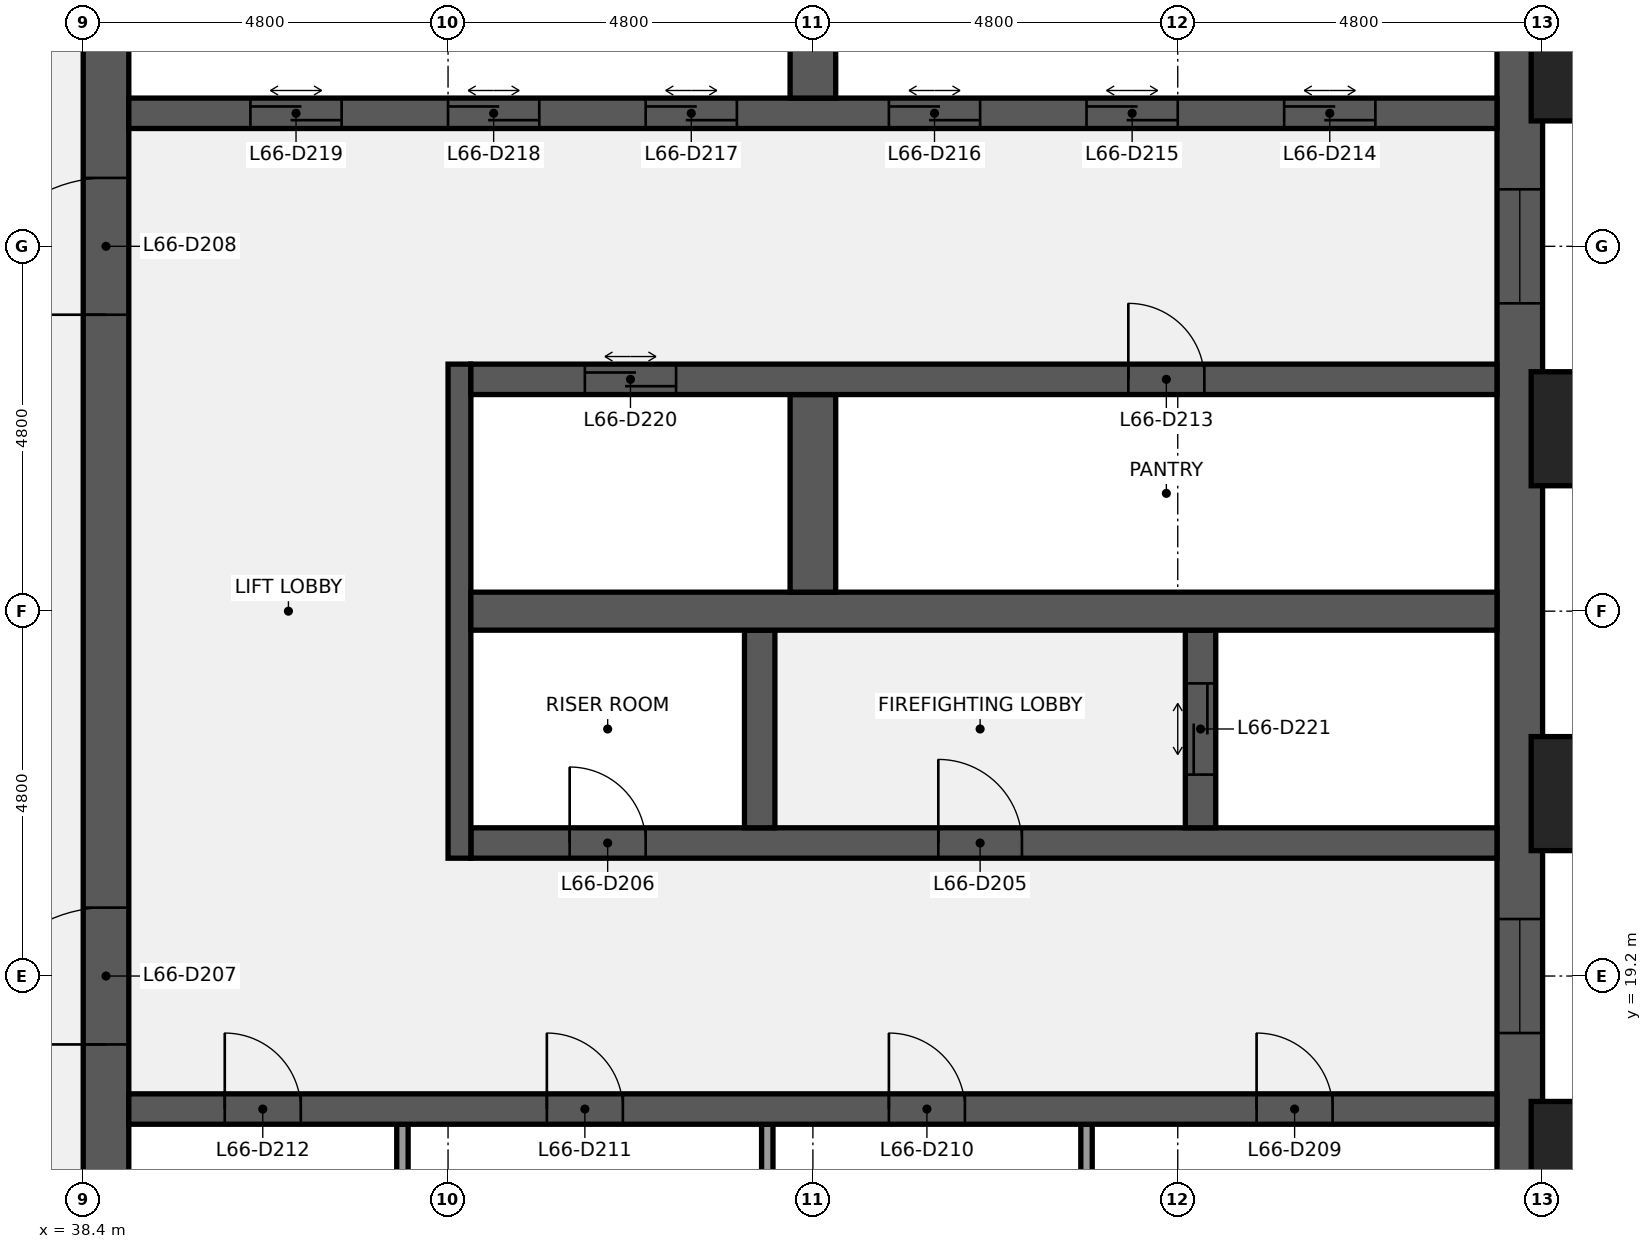
"""IFC4 building model, lengths in metres.
Left out: names, types, materials, properties, quantities, classifications, styles, units other than length and angle.
Written with IfcOpenShell. Run it as: python <this file> out.ifc"""

import sys

from ifc_helpers import new_model, si_unit, direction, frame, frame_2d, origin, origin_2d, place, context, subcontext, project, spatial, rectangle, extrude, element, fill, save


model = new_model("IFC4")
c1 = context("Model", 3, precision=1e-05, world=origin(), true_north=direction((0.0, 1.0)))
c2 = subcontext(c1, "Body", "Model", "MODEL_VIEW")
j1 = project(units=[si_unit("LENGTHUNIT", "METRE"), si_unit("PLANEANGLEUNIT", "RADIAN")], contexts=[c1])
p1 = place(None, origin())
s1 = spatial("IfcSite", under=j1, at=p1, CompositionType="ELEMENT")
p2 = place(p1, origin())
s2 = spatial("IfcBuilding", under=s1, at=p2, CompositionType="ELEMENT")
p3 = place(p2, frame((0.0, 0.0, 302.3)))
s3 = spatial("IfcBuildingStorey", under=s2, at=p3, CompositionType="ELEMENT", Elevation=302.3)
p4 = place(p3, frame((57.3, 38.4, 0.0), z_axis=(0.0, 0.0, 1.0), x_axis=(0.0, -1.0, 0.0)))
e1 = element("IfcWall", 1, at=p4, inside=s3, PredefinedType="SHEAR", context=c2, shape_type="SweptSolid", body=[
    extrude(rectangle(XDim=28.8, YDim=0.6, at=frame_2d((14.4, 0.0))), origin(), (0.0, 0.0, 1.0), 3.84),
])
p5 = place(p4, frame((18.45, 0.0, 0.9)))
e2 = element("IfcOpeningElement", 2, at=p5, cuts=e1, PredefinedType="OPENING", context=c2, shape_type="SweptSolid", body=[
    extrude(rectangle(XDim=1.5, YDim=1.5, at=frame_2d((0.75, 0.75))), frame((0.0, 0.31, 0.0), z_axis=(0.0, -1.0, 0.0), x_axis=(1.0, 0.0, 0.0)), (0.0, 0.0, 1.0), 0.62),
])
p6 = place(p4, frame((8.85, 0.0, 0.9)))
e3 = element("IfcOpeningElement", 3, at=p6, cuts=e1, PredefinedType="OPENING", context=c2, shape_type="SweptSolid", body=[
    extrude(rectangle(XDim=1.5, YDim=1.5, at=frame_2d((0.75, 0.75))), frame((0.0, 0.31, 0.0), z_axis=(0.0, -1.0, 0.0), x_axis=(1.0, 0.0, 0.0)), (0.0, 0.0, 1.0), 0.62),
])
p7 = place(p3, frame((38.7, 9.6, 0.0), z_axis=(0.0, 0.0, 1.0), x_axis=(0.0, 1.0, 0.0)))
e4 = element("IfcWall", 4, at=p7, inside=s3, PredefinedType="SHEAR", context=c2, shape_type="SweptSolid", body=[
    extrude(rectangle(XDim=28.8, YDim=0.6, at=frame_2d((14.4, 0.0))), origin(), (0.0, 0.0, 1.0), 3.84),
])
p8 = place(p7, frame((8.7, 0.0, 0.0)))
e5 = element("IfcOpeningElement", 5, at=p8, cuts=e4, PredefinedType="OPENING", context=c2, shape_type="SweptSolid", body=[
    extrude(rectangle(XDim=1.8, YDim=2.1, at=frame_2d((0.9, 1.05))), frame((0.0, 0.31, 0.0), z_axis=(0.0, -1.0, 0.0), x_axis=(1.0, 0.0, 0.0)), (0.0, 0.0, 1.0), 0.62),
])
p9 = place(p7, frame((18.3, 0.0, 0.0)))
e6 = element("IfcOpeningElement", 6, at=p9, cuts=e4, PredefinedType="OPENING", context=c2, shape_type="SweptSolid", body=[
    extrude(rectangle(XDim=1.8, YDim=2.1, at=frame_2d((0.9, 1.05))), frame((0.0, 0.31, 0.0), z_axis=(0.0, -1.0, 0.0), x_axis=(1.0, 0.0, 0.0)), (0.0, 0.0, 1.0), 0.62),
])
for number, where, z_axis, x_axis in (
    (7, (51.6, 14.65, 0.0), (0.0, 0.0, 1.0), (0.0, 1.0, 0.0)),
    (8, (47.4, 14.65, 0.0), (0.0, 0.0, 1.0), (0.0, 1.0, 0.0)),
    (9, (42.6, 14.65, 0.0), (0.0, 0.0, 1.0), (0.0, 1.0, 0.0)),
):
    element("IfcWall", number, at=place(p3, frame(where, z_axis=z_axis, x_axis=x_axis)), inside=s3, PredefinedType="PARTITIONING", context=c2, shape_type="SweptSolid", body=[
        extrude(rectangle(XDim=2.6, YDim=0.15, at=frame_2d((1.3, 0.0))), origin(), (0.0, 0.0, 1.0), 3.84),
    ])
p10 = place(p3, frame((39.0, 17.45, 0.0), z_axis=(0.0, 0.0, 1.0), x_axis=(1.0, 0.0, 0.0)))
e10 = element("IfcWall", 10, at=p10, inside=s3, PredefinedType="SHEAR", context=c2, shape_type="SweptSolid", body=[
    extrude(rectangle(XDim=18.0, YDim=0.4, at=frame_2d((9.0, 0.0))), origin(), (0.0, 0.0, 1.0), 3.84),
])
p11 = place(p10, frame((14.837, 0.0, 0.0)))
e11 = element("IfcOpeningElement", 11, at=p11, cuts=e10, PredefinedType="OPENING", context=c2, shape_type="SweptSolid", body=[
    extrude(rectangle(XDim=1.0, YDim=2.1, at=frame_2d((0.5, 1.05))), frame((0.0, 0.21, 0.0), z_axis=(0.0, -1.0, 0.0), x_axis=(1.0, 0.0, 0.0)), (0.0, 0.0, 1.0), 0.42),
])
p12 = place(p10, frame((10.0, 0.0, 0.0)))
e12 = element("IfcOpeningElement", 12, at=p12, cuts=e10, PredefinedType="OPENING", context=c2, shape_type="SweptSolid", body=[
    extrude(rectangle(XDim=1.0, YDim=2.1, at=frame_2d((0.5, 1.05))), frame((0.0, 0.21, 0.0), z_axis=(0.0, -1.0, 0.0), x_axis=(1.0, 0.0, 0.0)), (0.0, 0.0, 1.0), 0.42),
])
p13 = place(p10, frame((5.5, 0.0, 0.0)))
e13 = element("IfcOpeningElement", 13, at=p13, cuts=e10, PredefinedType="OPENING", context=c2, shape_type="SweptSolid", body=[
    extrude(rectangle(XDim=1.0, YDim=2.1, at=frame_2d((0.5, 1.05))), frame((0.0, 0.21, 0.0), z_axis=(0.0, -1.0, 0.0), x_axis=(1.0, 0.0, 0.0)), (0.0, 0.0, 1.0), 0.42),
])
p14 = place(p10, frame((1.262, 0.0, 0.0)))
e14 = element("IfcOpeningElement", 14, at=p14, cuts=e10, PredefinedType="OPENING", context=c2, shape_type="SweptSolid", body=[
    extrude(rectangle(XDim=1.0, YDim=2.1, at=frame_2d((0.5, 1.05))), frame((0.0, 0.21, 0.0), z_axis=(0.0, -1.0, 0.0), x_axis=(1.0, 0.0, 0.0)), (0.0, 0.0, 1.0), 0.42),
])
p15 = place(p3, frame((43.5, 20.95, 0.0), z_axis=(0.0, 0.0, 1.0), x_axis=(1.0, 0.0, 0.0)))
e15 = element("IfcWall", 15, at=p15, inside=s3, PredefinedType="SHEAR", context=c2, shape_type="SweptSolid", body=[
    extrude(rectangle(XDim=13.5, YDim=0.4, at=frame_2d((6.75, 0.0))), origin(), (0.0, 0.0, 1.0), 3.84),
])
p16 = place(p15, frame((6.15, 0.0, 0.0)))
e16 = element("IfcOpeningElement", 16, at=p16, cuts=e15, PredefinedType="OPENING", context=c2, shape_type="SweptSolid", body=[
    extrude(rectangle(XDim=1.1, YDim=2.1, at=frame_2d((0.55, 1.05))), frame((0.0, 0.21, 0.0), z_axis=(0.0, -1.0, 0.0), x_axis=(1.0, 0.0, 0.0)), (0.0, 0.0, 1.0), 0.42),
])
p17 = place(p15, frame((1.3, 0.0, 0.0)))
e17 = element("IfcOpeningElement", 17, at=p17, cuts=e15, PredefinedType="OPENING", context=c2, shape_type="SweptSolid", body=[
    extrude(rectangle(XDim=1.0, YDim=2.1, at=frame_2d((0.5, 1.05))), frame((0.0, 0.21, 0.0), z_axis=(0.0, -1.0, 0.0), x_axis=(1.0, 0.0, 0.0)), (0.0, 0.0, 1.0), 0.42),
])
p18 = place(p3, frame((43.35, 20.75, 0.0), z_axis=(0.0, 0.0, 1.0), x_axis=(0.0, 1.0, 0.0)))
e18 = element("IfcWall", 18, at=p18, inside=s3, PredefinedType="SHEAR", context=c2, shape_type="SweptSolid", body=[
    extrude(rectangle(XDim=6.5, YDim=0.3, at=frame_2d((3.25, 0.0))), origin(), (0.0, 0.0, 1.0), 3.84),
])
p19 = place(p3, frame((53.1, 21.15, 0.0), z_axis=(0.0, 0.0, 1.0), x_axis=(0.0, 1.0, 0.0)))
e19 = element("IfcWall", 19, at=p19, inside=s3, PredefinedType="SHEAR", context=c2, shape_type="SweptSolid", body=[
    extrude(rectangle(XDim=2.6, YDim=0.4, at=frame_2d((1.3, 0.0))), origin(), (0.0, 0.0, 1.0), 3.84),
])
p20 = place(p19, frame((0.7, 0.0, 0.0)))
e20 = element("IfcOpeningElement", 20, at=p20, cuts=e19, PredefinedType="OPENING", context=c2, shape_type="SweptSolid", body=[
    extrude(rectangle(XDim=1.2, YDim=2.1, at=frame_2d((0.6, 1.05))), frame((0.0, 0.21, 0.0), z_axis=(0.0, -1.0, 0.0), x_axis=(1.0, 0.0, 0.0)), (0.0, 0.0, 1.0), 0.42),
])
p21 = place(p3, frame((47.3, 21.15, 0.0), z_axis=(0.0, 0.0, 1.0), x_axis=(0.0, 1.0, 0.0)))
e21 = element("IfcWall", 21, at=p21, inside=s3, PredefinedType="SHEAR", context=c2, shape_type="SweptSolid", body=[
    extrude(rectangle(XDim=2.6, YDim=0.4, at=frame_2d((1.3, 0.0))), origin(), (0.0, 0.0, 1.0), 3.84),
])
p22 = place(p3, frame((43.5, 24.0, 0.0), z_axis=(0.0, 0.0, 1.0), x_axis=(1.0, 0.0, 0.0)))
e22 = element("IfcWall", 22, at=p22, inside=s3, PredefinedType="SHEAR", context=c2, shape_type="SweptSolid", body=[
    extrude(rectangle(XDim=13.5, YDim=0.5, at=frame_2d((6.75, 0.0))), origin(), (0.0, 0.0, 1.0), 3.84),
])
p23 = place(p3, frame((48.0, 24.25, 0.0), z_axis=(0.0, 0.0, 1.0), x_axis=(0.0, 1.0, 0.0)))
e23 = element("IfcWall", 23, at=p23, inside=s3, PredefinedType="SHEAR", context=c2, shape_type="SweptSolid", body=[
    extrude(rectangle(XDim=2.6, YDim=0.6, at=frame_2d((1.3, 0.0))), origin(), (0.0, 0.0, 1.0), 3.84),
])
p24 = place(p3, frame((43.5, 27.05, 0.0), z_axis=(0.0, 0.0, 1.0), x_axis=(1.0, 0.0, 0.0)))
e24 = element("IfcWall", 24, at=p24, inside=s3, PredefinedType="SHEAR", context=c2, shape_type="SweptSolid", body=[
    extrude(rectangle(XDim=13.5, YDim=0.4, at=frame_2d((6.75, 0.0))), origin(), (0.0, 0.0, 1.0), 3.84),
])
p25 = place(p24, frame((8.65, 0.0, 0.0)))
e25 = element("IfcOpeningElement", 25, at=p25, cuts=e24, PredefinedType="OPENING", context=c2, shape_type="SweptSolid", body=[
    extrude(rectangle(XDim=1.0, YDim=2.1, at=frame_2d((0.5, 1.05))), frame((0.0, 0.21, 0.0), z_axis=(0.0, -1.0, 0.0), x_axis=(1.0, 0.0, 0.0)), (0.0, 0.0, 1.0), 0.42),
])
p26 = place(p24, frame((1.5, 0.0, 0.0)))
e26 = element("IfcOpeningElement", 26, at=p26, cuts=e24, PredefinedType="OPENING", context=c2, shape_type="SweptSolid", body=[
    extrude(rectangle(XDim=1.2, YDim=2.1, at=frame_2d((0.6, 1.05))), frame((0.0, 0.21, 0.0), z_axis=(0.0, -1.0, 0.0), x_axis=(1.0, 0.0, 0.0)), (0.0, 0.0, 1.0), 0.42),
])
p27 = place(p3, frame((39.0, 30.55, 0.0), z_axis=(0.0, 0.0, 1.0), x_axis=(1.0, 0.0, 0.0)))
e27 = element("IfcWall", 27, at=p27, inside=s3, PredefinedType="SHEAR", context=c2, shape_type="SweptSolid", body=[
    extrude(rectangle(XDim=18.0, YDim=0.4, at=frame_2d((9.0, 0.0))), origin(), (0.0, 0.0, 1.0), 3.84),
])
p28 = place(p27, frame((15.2, 0.0, 0.0)))
e28 = element("IfcOpeningElement", 28, at=p28, cuts=e27, PredefinedType="OPENING", context=c2, shape_type="SweptSolid", body=[
    extrude(rectangle(XDim=1.2, YDim=2.1, at=frame_2d((0.6, 1.05))), frame((0.0, 0.21, 0.0), z_axis=(0.0, -1.0, 0.0), x_axis=(1.0, 0.0, 0.0)), (0.0, 0.0, 1.0), 0.42),
])
p29 = place(p27, frame((12.6, 0.0, 0.0)))
e29 = element("IfcOpeningElement", 29, at=p29, cuts=e27, PredefinedType="OPENING", context=c2, shape_type="SweptSolid", body=[
    extrude(rectangle(XDim=1.2, YDim=2.1, at=frame_2d((0.6, 1.05))), frame((0.0, 0.21, 0.0), z_axis=(0.0, -1.0, 0.0), x_axis=(1.0, 0.0, 0.0)), (0.0, 0.0, 1.0), 0.42),
])
p30 = place(p27, frame((10.0, 0.0, 0.0)))
e30 = element("IfcOpeningElement", 30, at=p30, cuts=e27, PredefinedType="OPENING", context=c2, shape_type="SweptSolid", body=[
    extrude(rectangle(XDim=1.2, YDim=2.1, at=frame_2d((0.6, 1.05))), frame((0.0, 0.21, 0.0), z_axis=(0.0, -1.0, 0.0), x_axis=(1.0, 0.0, 0.0)), (0.0, 0.0, 1.0), 0.42),
])
p31 = place(p27, frame((6.8, 0.0, 0.0)))
e31 = element("IfcOpeningElement", 31, at=p31, cuts=e27, PredefinedType="OPENING", context=c2, shape_type="SweptSolid", body=[
    extrude(rectangle(XDim=1.2, YDim=2.1, at=frame_2d((0.6, 1.05))), frame((0.0, 0.21, 0.0), z_axis=(0.0, -1.0, 0.0), x_axis=(1.0, 0.0, 0.0)), (0.0, 0.0, 1.0), 0.42),
])
p32 = place(p27, frame((4.2, 0.0, 0.0)))
e32 = element("IfcOpeningElement", 32, at=p32, cuts=e27, PredefinedType="OPENING", context=c2, shape_type="SweptSolid", body=[
    extrude(rectangle(XDim=1.2, YDim=2.1, at=frame_2d((0.6, 1.05))), frame((0.0, 0.21, 0.0), z_axis=(0.0, -1.0, 0.0), x_axis=(1.0, 0.0, 0.0)), (0.0, 0.0, 1.0), 0.42),
])
p33 = place(p27, frame((1.6, 0.0, 0.0)))
e33 = element("IfcOpeningElement", 33, at=p33, cuts=e27, PredefinedType="OPENING", context=c2, shape_type="SweptSolid", body=[
    extrude(rectangle(XDim=1.2, YDim=2.1, at=frame_2d((0.6, 1.05))), frame((0.0, 0.21, 0.0), z_axis=(0.0, -1.0, 0.0), x_axis=(1.0, 0.0, 0.0)), (0.0, 0.0, 1.0), 0.42),
])
p34 = place(p3, frame((48.0, 30.75, 0.0), z_axis=(0.0, 0.0, 1.0), x_axis=(0.0, 1.0, 0.0)))
e34 = element("IfcWall", 34, at=p34, inside=s3, PredefinedType="SHEAR", context=c2, shape_type="SweptSolid", body=[
    extrude(rectangle(XDim=2.6, YDim=0.6, at=frame_2d((1.3, 0.0))), origin(), (0.0, 0.0, 1.0), 3.84),
])
for number, where, z_axis, x_axis in (
    (35, (58.35, 16.8, 0.0), (0.0, 0.0, 1.0), (0.0, 1.0, 0.0)),
    (36, (58.35, 21.6, 0.0), (0.0, 0.0, 1.0), (0.0, 1.0, 0.0)),
    (37, (58.35, 26.4, 0.0), (0.0, 0.0, 1.0), (0.0, 1.0, 0.0)),
    (38, (58.35, 31.2, 0.0), (0.0, 0.0, 1.0), (0.0, 1.0, 0.0)),
):
    element("IfcColumn", number, at=place(p3, frame(where, z_axis=z_axis, x_axis=x_axis)), inside=s3, PredefinedType="PILASTER", context=c2, shape_type="SweptSolid", body=[
        extrude(rectangle(XDim=1.8, YDim=1.5, at=origin_2d()), origin(), (0.0, 0.0, 1.0), 4.0),
    ])
p35 = place(p16, origin())
e39 = element("IfcDoor", 39, at=p35, inside=s3, OperationType="SINGLE_SWING_LEFT", PredefinedType="DOOR", context=c2, shape_type="SweptSolid", body=[
    extrude(rectangle(XDim=1.1, YDim=2.1, at=frame_2d((0.55, 1.05))), frame((0.0, 0.025, 0.0), z_axis=(0.0, -1.0, 0.0), x_axis=(1.0, 0.0, 0.0)), (0.0, 0.0, 1.0), 0.05),
])
fill(e16, e39)
p36 = place(p17, origin())
e40 = element("IfcDoor", 40, at=p36, inside=s3, OperationType="SINGLE_SWING_LEFT", PredefinedType="DOOR", context=c2, shape_type="SweptSolid", body=[
    extrude(rectangle(XDim=1.0, YDim=2.1, at=frame_2d((0.5, 1.05))), frame((0.0, 0.025, 0.0), z_axis=(0.0, -1.0, 0.0), x_axis=(1.0, 0.0, 0.0)), (0.0, 0.0, 1.0), 0.05),
])
fill(e17, e40)
p37 = place(p8, origin())
e41 = element("IfcDoor", 41, at=p37, inside=s3, OperationType="DOUBLE_DOOR_SINGLE_SWING", PredefinedType="DOOR", context=c2, shape_type="SweptSolid", body=[
    extrude(rectangle(XDim=1.8, YDim=2.1, at=frame_2d((0.9, 1.05))), frame((0.0, 0.025, 0.0), z_axis=(0.0, -1.0, 0.0), x_axis=(1.0, 0.0, 0.0)), (0.0, 0.0, 1.0), 0.05),
])
fill(e5, e41)
p38 = place(p9, origin())
e42 = element("IfcDoor", 42, at=p38, inside=s3, OperationType="DOUBLE_DOOR_SINGLE_SWING", PredefinedType="DOOR", context=c2, shape_type="SweptSolid", body=[
    extrude(rectangle(XDim=1.8, YDim=2.1, at=frame_2d((0.9, 1.05))), frame((0.0, 0.025, 0.0), z_axis=(0.0, -1.0, 0.0), x_axis=(1.0, 0.0, 0.0)), (0.0, 0.0, 1.0), 0.05),
])
fill(e6, e42)
p39 = place(p11, origin())
e43 = element("IfcDoor", 43, at=p39, inside=s3, OperationType="SINGLE_SWING_LEFT", PredefinedType="DOOR", context=c2, shape_type="SweptSolid", body=[
    extrude(rectangle(XDim=1.0, YDim=2.1, at=frame_2d((0.5, 1.05))), frame((0.0, 0.025, 0.0), z_axis=(0.0, -1.0, 0.0), x_axis=(1.0, 0.0, 0.0)), (0.0, 0.0, 1.0), 0.05),
])
fill(e11, e43)
p40 = place(p12, origin())
e44 = element("IfcDoor", 44, at=p40, inside=s3, OperationType="SINGLE_SWING_LEFT", PredefinedType="DOOR", context=c2, shape_type="SweptSolid", body=[
    extrude(rectangle(XDim=1.0, YDim=2.1, at=frame_2d((0.5, 1.05))), frame((0.0, 0.025, 0.0), z_axis=(0.0, -1.0, 0.0), x_axis=(1.0, 0.0, 0.0)), (0.0, 0.0, 1.0), 0.05),
])
fill(e12, e44)
p41 = place(p13, origin())
e45 = element("IfcDoor", 45, at=p41, inside=s3, OperationType="SINGLE_SWING_LEFT", PredefinedType="DOOR", context=c2, shape_type="SweptSolid", body=[
    extrude(rectangle(XDim=1.0, YDim=2.1, at=frame_2d((0.5, 1.05))), frame((0.0, 0.025, 0.0), z_axis=(0.0, -1.0, 0.0), x_axis=(1.0, 0.0, 0.0)), (0.0, 0.0, 1.0), 0.05),
])
fill(e13, e45)
p42 = place(p14, origin())
e46 = element("IfcDoor", 46, at=p42, inside=s3, OperationType="SINGLE_SWING_LEFT", PredefinedType="DOOR", context=c2, shape_type="SweptSolid", body=[
    extrude(rectangle(XDim=1.0, YDim=2.1, at=frame_2d((0.5, 1.05))), frame((0.0, 0.025, 0.0), z_axis=(0.0, -1.0, 0.0), x_axis=(1.0, 0.0, 0.0)), (0.0, 0.0, 1.0), 0.05),
])
fill(e14, e46)
p43 = place(p25, origin())
e47 = element("IfcDoor", 47, at=p43, inside=s3, OperationType="SINGLE_SWING_LEFT", PredefinedType="DOOR", context=c2, shape_type="SweptSolid", body=[
    extrude(rectangle(XDim=1.0, YDim=2.1, at=frame_2d((0.5, 1.05))), frame((0.0, 0.025, 0.0), z_axis=(0.0, -1.0, 0.0), x_axis=(1.0, 0.0, 0.0)), (0.0, 0.0, 1.0), 0.05),
])
fill(e25, e47)
p44 = place(p28, origin())
e48 = element("IfcDoor", 48, at=p44, inside=s3, OperationType="DOUBLE_DOOR_SLIDING", PredefinedType="DOOR", context=c2, shape_type="SweptSolid", body=[
    extrude(rectangle(XDim=1.2, YDim=2.1, at=frame_2d((0.6, 1.05))), frame((0.0, 0.025, 0.0), z_axis=(0.0, -1.0, 0.0), x_axis=(1.0, 0.0, 0.0)), (0.0, 0.0, 1.0), 0.05),
])
fill(e28, e48)
p45 = place(p29, origin())
e49 = element("IfcDoor", 49, at=p45, inside=s3, OperationType="DOUBLE_DOOR_SLIDING", PredefinedType="DOOR", context=c2, shape_type="SweptSolid", body=[
    extrude(rectangle(XDim=1.2, YDim=2.1, at=frame_2d((0.6, 1.05))), frame((0.0, 0.025, 0.0), z_axis=(0.0, -1.0, 0.0), x_axis=(1.0, 0.0, 0.0)), (0.0, 0.0, 1.0), 0.05),
])
fill(e29, e49)
p46 = place(p30, origin())
e50 = element("IfcDoor", 50, at=p46, inside=s3, OperationType="DOUBLE_DOOR_SLIDING", PredefinedType="DOOR", context=c2, shape_type="SweptSolid", body=[
    extrude(rectangle(XDim=1.2, YDim=2.1, at=frame_2d((0.6, 1.05))), frame((0.0, 0.025, 0.0), z_axis=(0.0, -1.0, 0.0), x_axis=(1.0, 0.0, 0.0)), (0.0, 0.0, 1.0), 0.05),
])
fill(e30, e50)
p47 = place(p31, origin())
e51 = element("IfcDoor", 51, at=p47, inside=s3, OperationType="DOUBLE_DOOR_SLIDING", PredefinedType="DOOR", context=c2, shape_type="SweptSolid", body=[
    extrude(rectangle(XDim=1.2, YDim=2.1, at=frame_2d((0.6, 1.05))), frame((0.0, 0.025, 0.0), z_axis=(0.0, -1.0, 0.0), x_axis=(1.0, 0.0, 0.0)), (0.0, 0.0, 1.0), 0.05),
])
fill(e31, e51)
p48 = place(p32, origin())
e52 = element("IfcDoor", 52, at=p48, inside=s3, OperationType="DOUBLE_DOOR_SLIDING", PredefinedType="DOOR", context=c2, shape_type="SweptSolid", body=[
    extrude(rectangle(XDim=1.2, YDim=2.1, at=frame_2d((0.6, 1.05))), frame((0.0, 0.025, 0.0), z_axis=(0.0, -1.0, 0.0), x_axis=(1.0, 0.0, 0.0)), (0.0, 0.0, 1.0), 0.05),
])
fill(e32, e52)
p49 = place(p33, origin())
e53 = element("IfcDoor", 53, at=p49, inside=s3, OperationType="DOUBLE_DOOR_SLIDING", PredefinedType="DOOR", context=c2, shape_type="SweptSolid", body=[
    extrude(rectangle(XDim=1.2, YDim=2.1, at=frame_2d((0.6, 1.05))), frame((0.0, 0.025, 0.0), z_axis=(0.0, -1.0, 0.0), x_axis=(1.0, 0.0, 0.0)), (0.0, 0.0, 1.0), 0.05),
])
fill(e33, e53)
p50 = place(p26, origin())
e54 = element("IfcDoor", 54, at=p50, inside=s3, OperationType="DOUBLE_DOOR_SLIDING", PredefinedType="DOOR", context=c2, shape_type="SweptSolid", body=[
    extrude(rectangle(XDim=1.2, YDim=2.1, at=frame_2d((0.6, 1.05))), frame((0.0, 0.025, 0.0), z_axis=(0.0, -1.0, 0.0), x_axis=(1.0, 0.0, 0.0)), (0.0, 0.0, 1.0), 0.05),
])
fill(e26, e54)
p51 = place(p20, origin())
e55 = element("IfcDoor", 55, at=p51, inside=s3, OperationType="DOUBLE_DOOR_SLIDING", PredefinedType="DOOR", context=c2, shape_type="SweptSolid", body=[
    extrude(rectangle(XDim=1.2, YDim=2.1, at=frame_2d((0.6, 1.05))), frame((0.0, 0.025, 0.0), z_axis=(0.0, -1.0, 0.0), x_axis=(1.0, 0.0, 0.0)), (0.0, 0.0, 1.0), 0.05),
])
fill(e20, e55)
p52 = place(p5, origin())
e56 = element("IfcWindow", 56, at=p52, inside=s3, PartitioningType="SINGLE_PANEL", PredefinedType="WINDOW", context=c2, shape_type="SweptSolid", body=[
    extrude(rectangle(XDim=1.5, YDim=1.5, at=frame_2d((0.75, 0.75))), frame((0.0, 0.03, 0.0), z_axis=(0.0, -1.0, 0.0), x_axis=(1.0, 0.0, 0.0)), (0.0, 0.0, 1.0), 0.06),
])
fill(e2, e56)
p53 = place(p6, origin())
e57 = element("IfcWindow", 57, at=p53, inside=s3, PartitioningType="SINGLE_PANEL", PredefinedType="WINDOW", context=c2, shape_type="SweptSolid", body=[
    extrude(rectangle(XDim=1.5, YDim=1.5, at=frame_2d((0.75, 0.75))), frame((0.0, 0.03, 0.0), z_axis=(0.0, -1.0, 0.0), x_axis=(1.0, 0.0, 0.0)), (0.0, 0.0, 1.0), 0.06),
])
fill(e3, e57)
save(model, sys.argv[1])
